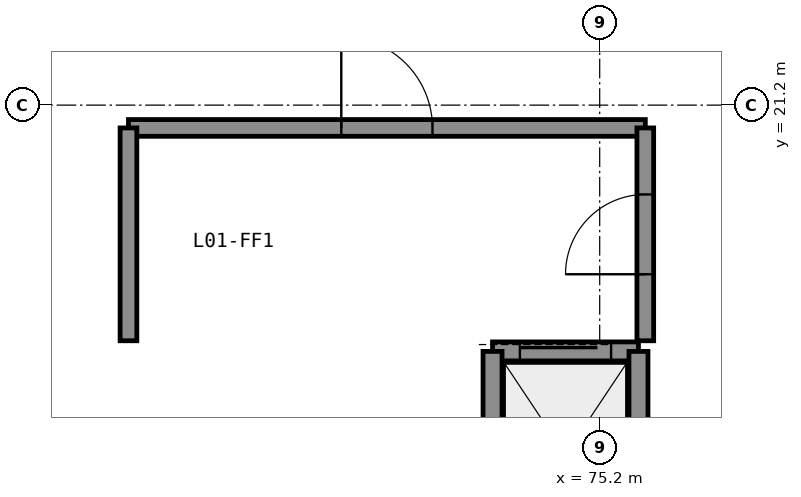
"""IFC4 building model, lengths in metres.
Left out: names, types, materials, properties, quantities, classifications, styles, units other than length and angle.
Written with IfcOpenShell. Run it as: python <this file> out.ifc"""

import sys

from ifc_helpers import new_model, si_unit, direction, frame, frame_2d, origin, place, context, subcontext, project, spatial, rectangle, extrude, element, fill, save


model = new_model("IFC4")
c1 = context("Model", 3, precision=1e-05, world=origin(), true_north=direction((0.0, 1.0)))
c2 = subcontext(c1, "Body", "Model", "MODEL_VIEW")
j1 = project(units=[si_unit("LENGTHUNIT", "METRE"), si_unit("PLANEANGLEUNIT", "RADIAN")], contexts=[c1])
p1 = place(None, origin())
s1 = spatial("IfcSite", under=j1, at=p1, CompositionType="ELEMENT")
p2 = place(p1, origin())
s2 = spatial("IfcBuilding", under=s1, at=p2, CompositionType="ELEMENT")
p3 = place(p2, frame((0.0, 0.0, 4.8)))
s3 = spatial("IfcBuildingStorey", under=s2, at=p3, CompositionType="ELEMENT", Elevation=4.8)
p4 = place(p3, frame((69.0, 20.9, 0.0), z_axis=(0.0, 0.0, 1.0), x_axis=(1.0, 0.0, 0.0)))
e1 = element("IfcWall", 1, at=p4, inside=s3, PredefinedType="SOLIDWALL", context=c2, shape_type="SweptSolid", body=[
    extrude(rectangle(XDim=6.8, YDim=0.22, at=frame_2d((3.4, 0.0))), origin(), (0.0, 0.0, 1.0), 4.43),
])
p5 = place(p4, frame((2.8, 0.0, 0.0)))
e2 = element("IfcOpeningElement", 2, at=p5, cuts=e1, PredefinedType="OPENING", context=c2, shape_type="SweptSolid", body=[
    extrude(rectangle(XDim=1.2, YDim=2.1, at=frame_2d((0.6, 1.05))), frame((0.0, 0.12, 0.0), z_axis=(0.0, -1.0, 0.0), x_axis=(1.0, 0.0, 0.0)), (0.0, 0.0, 1.0), 0.24),
])
p6 = place(p3, frame((69.0, 18.1, 0.0), z_axis=(0.0, 0.0, 1.0), x_axis=(0.0, 1.0, 0.0)))
e3 = element("IfcWall", 3, at=p6, inside=s3, PredefinedType="SOLIDWALL", context=c2, shape_type="SweptSolid", body=[
    extrude(rectangle(XDim=2.8, YDim=0.22, at=frame_2d((1.4, 0.0))), origin(), (0.0, 0.0, 1.0), 4.43),
])
p7 = place(p3, frame((75.8, 18.1, 0.0), z_axis=(0.0, 0.0, 1.0), x_axis=(0.0, 1.0, 0.0)))
e4 = element("IfcWall", 4, at=p7, inside=s3, PredefinedType="SOLIDWALL", context=c2, shape_type="SweptSolid", body=[
    extrude(rectangle(XDim=2.8, YDim=0.22, at=frame_2d((1.4, 0.0))), origin(), (0.0, 0.0, 1.0), 4.43),
])
p8 = place(p7, frame((0.875, 0.0, 0.0)))
e5 = element("IfcOpeningElement", 5, at=p8, cuts=e4, PredefinedType="OPENING", context=c2, shape_type="SweptSolid", body=[
    extrude(rectangle(XDim=1.05, YDim=2.1, at=frame_2d((0.525, 1.05))), frame((0.0, 0.12, 0.0), z_axis=(0.0, -1.0, 0.0), x_axis=(1.0, 0.0, 0.0)), (0.0, 0.0, 1.0), 0.24),
])
p9 = place(p3, frame((73.79, 17.96, 0.0), z_axis=(0.0, 0.0, 1.0), x_axis=(1.0, 0.0, 0.0)))
e6 = element("IfcWall", 6, at=p9, inside=s3, PredefinedType="SHEAR", context=c2, shape_type="SweptSolid", body=[
    extrude(rectangle(XDim=1.92, YDim=0.25, at=frame_2d((0.96, 0.0))), origin(), (0.0, 0.0, 1.0), 4.54),
])
p10 = place(p9, frame((0.36, 0.0, 0.0)))
e7 = element("IfcOpeningElement", 7, at=p10, cuts=e6, PredefinedType="OPENING", context=c2, shape_type="SweptSolid", body=[
    extrude(rectangle(XDim=1.2, YDim=2.2, at=frame_2d((0.6, 1.1))), frame((0.0, 0.135, 0.0), z_axis=(0.0, -1.0, 0.0), x_axis=(1.0, 0.0, 0.0)), (0.0, 0.0, 1.0), 0.27),
])
for number, where, z_axis, x_axis in (
    (8, (73.79, 15.24, 0.0), (0.0, 0.0, 1.0), (0.0, 1.0, 0.0)),
    (9, (75.71, 15.24, 0.0), (0.0, 0.0, 1.0), (0.0, 1.0, 0.0)),
):
    element("IfcWall", number, at=place(p3, frame(where, z_axis=z_axis, x_axis=x_axis)), inside=s3, PredefinedType="SHEAR", context=c2, shape_type="SweptSolid", body=[
        extrude(rectangle(XDim=2.72, YDim=0.25, at=frame_2d((1.36, 0.0))), origin(), (0.0, 0.0, 1.0), 4.54),
    ])
p11 = place(p5, origin())
e10 = element("IfcDoor", 10, at=p11, inside=s3, OperationType="SINGLE_SWING_LEFT", PredefinedType="DOOR", context=c2, shape_type="SweptSolid", body=[
    extrude(rectangle(XDim=1.2, YDim=2.1, at=frame_2d((0.6, 1.05))), frame((0.0, 0.025, 0.0), z_axis=(0.0, -1.0, 0.0), x_axis=(1.0, 0.0, 0.0)), (0.0, 0.0, 1.0), 0.05),
])
fill(e2, e10)
p12 = place(p8, origin())
e11 = element("IfcDoor", 11, at=p12, inside=s3, OperationType="SINGLE_SWING_LEFT", PredefinedType="DOOR", context=c2, shape_type="SweptSolid", body=[
    extrude(rectangle(XDim=1.05, YDim=2.1, at=frame_2d((0.525, 1.05))), frame((0.0, 0.025, 0.0), z_axis=(0.0, -1.0, 0.0), x_axis=(1.0, 0.0, 0.0)), (0.0, 0.0, 1.0), 0.05),
])
fill(e5, e11)
p13 = place(p10, origin())
e12 = element("IfcDoor", 12, at=p13, inside=s3, OperationType="SLIDING_TO_LEFT", PredefinedType="DOOR", context=c2, shape_type="SweptSolid", body=[
    extrude(rectangle(XDim=1.2, YDim=2.2, at=frame_2d((0.6, 1.1))), frame((0.0, 0.025, 0.0), z_axis=(0.0, -1.0, 0.0), x_axis=(1.0, 0.0, 0.0)), (0.0, 0.0, 1.0), 0.05),
])
fill(e7, e12)
save(model, sys.argv[1])
